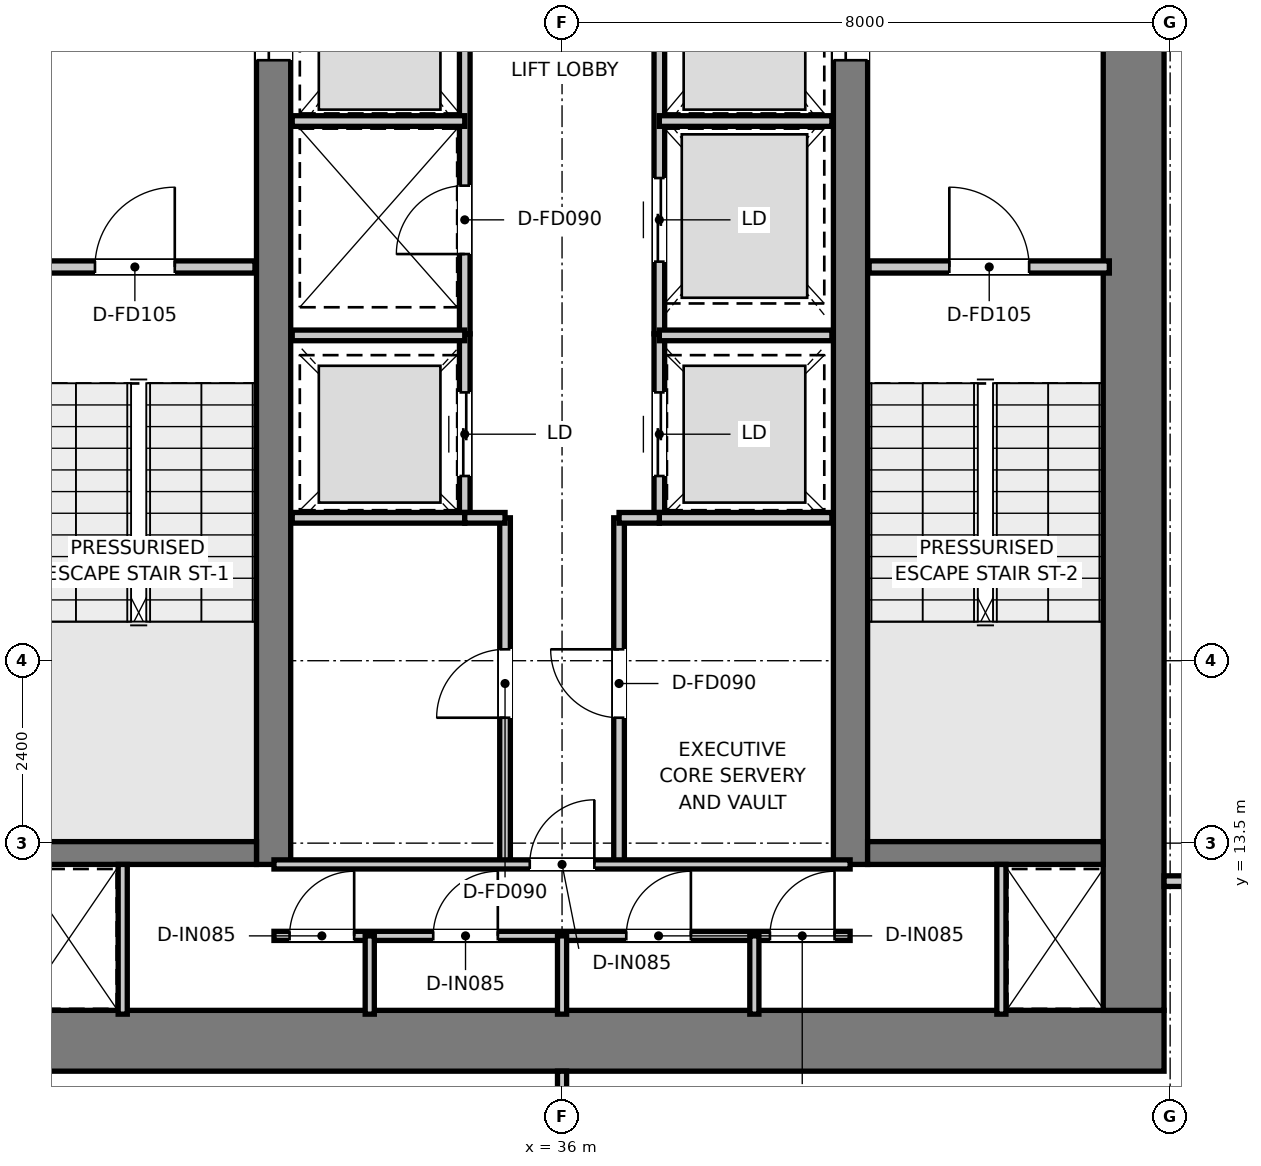
"""IFC4 building model, lengths in metres.
Left out: names, types, materials, properties, quantities, classifications, styles, units other than length and angle.
Written with IfcOpenShell. Run it as: python <this file> out.ifc"""

import sys

from ifc_helpers import new_model, si_unit, direction, frame, frame_2d, origin, place, context, subcontext, project, spatial, rectangle, extrude, element, fill, save


model = new_model("IFC4")
c1 = context("Model", 3, precision=1e-05, world=origin(), true_north=direction((0.0, 1.0)))
c2 = subcontext(c1, "Body", "Model", "MODEL_VIEW")
j1 = project(units=[si_unit("LENGTHUNIT", "METRE"), si_unit("PLANEANGLEUNIT", "RADIAN")], contexts=[c1])
p1 = place(None, origin())
s1 = spatial("IfcSite", under=j1, at=p1, CompositionType="ELEMENT")
p2 = place(p1, origin())
s2 = spatial("IfcBuilding", under=s1, at=p2, CompositionType="ELEMENT")
p3 = place(p2, frame((0.0, 0.0, 347.45)))
s3 = spatial("IfcBuildingStorey", under=s2, at=p3, CompositionType="ELEMENT", Elevation=347.45)
p4 = place(p3, frame((28.08, 10.9, 0.0), z_axis=(0.0, 0.0, 1.0), x_axis=(1.0, 0.0, 0.0)))
e1 = element("IfcWall", 1, at=p4, inside=s3, PredefinedType="SHEAR", context=c2, shape_type="SweptSolid", body=[
    extrude(rectangle(XDim=15.84, YDim=0.8, at=frame_2d((7.92, 0.0))), origin(), (0.0, 0.0, 1.0), 3.95),
])
p5 = place(p3, frame((43.52, 11.3, 0.0), z_axis=(0.0, 0.0, 1.0), x_axis=(0.0, 1.0, 0.0)))
e2 = element("IfcWall", 2, at=p5, inside=s3, PredefinedType="SHEAR", context=c2, shape_type="SweptSolid", body=[
    extrude(rectangle(XDim=14.7, YDim=0.8, at=frame_2d((7.35, 0.0))), origin(), (0.0, 0.0, 1.0), 3.95),
])
p6 = place(p3, frame((32.205, 13.22, 0.0), z_axis=(0.0, 0.0, 1.0), x_axis=(0.0, 1.0, 0.0)))
e3 = element("IfcWall", 3, at=p6, inside=s3, PredefinedType="SHEAR", context=c2, shape_type="SweptSolid", body=[
    extrude(rectangle(XDim=12.78, YDim=0.45, at=frame_2d((6.39, 0.0))), origin(), (0.0, 0.0, 1.0), 3.95),
])
p7 = place(p6, frame((10.58, 0.0, 0.0)))
e4 = element("IfcOpeningElement", 4, at=p7, cuts=e3, PredefinedType="OPENING", context=c2, shape_type="SweptSolid", body=[
    extrude(rectangle(XDim=1.1, YDim=2.15, at=frame_2d((0.55, 1.075))), frame((0.0, 0.235, 0.0), z_axis=(0.0, -1.0, 0.0), x_axis=(1.0, 0.0, 0.0)), (0.0, 0.0, 1.0), 0.47),
])
p8 = place(p3, frame((39.795, 13.22, 0.0), z_axis=(0.0, 0.0, 1.0), x_axis=(0.0, 1.0, 0.0)))
e5 = element("IfcWall", 5, at=p8, inside=s3, PredefinedType="SHEAR", context=c2, shape_type="SweptSolid", body=[
    extrude(rectangle(XDim=12.78, YDim=0.45, at=frame_2d((6.39, 0.0))), origin(), (0.0, 0.0, 1.0), 3.95),
])
p9 = place(p8, frame((10.58, 0.0, 0.0)))
e6 = element("IfcOpeningElement", 6, at=p9, cuts=e5, PredefinedType="OPENING", context=c2, shape_type="SweptSolid", body=[
    extrude(rectangle(XDim=1.1, YDim=2.15, at=frame_2d((0.55, 1.075))), frame((0.0, 0.235, 0.0), z_axis=(0.0, -1.0, 0.0), x_axis=(1.0, 0.0, 0.0)), (0.0, 0.0, 1.0), 0.47),
])
for number, where, z_axis, x_axis in (
    (7, (28.88, 13.37, 0.0), (0.0, 0.0, 1.0), (1.0, 0.0, 0.0)),
    (8, (40.02, 13.37, 0.0), (0.0, 0.0, 1.0), (1.0, 0.0, 0.0)),
):
    element("IfcWall", number, at=place(p3, frame(where, z_axis=z_axis, x_axis=x_axis)), inside=s3, PredefinedType="SHEAR", context=c2, shape_type="SweptSolid", body=[
        extrude(rectangle(XDim=3.1, YDim=0.3, at=frame_2d((1.55, 0.0))), origin(), (0.0, 0.0, 1.0), 3.95),
    ])
p10 = place(p3, frame((28.8, 21.08, 0.0), z_axis=(0.0, 0.0, 1.0), x_axis=(1.0, 0.0, 0.0)))
e9 = element("IfcWall", 9, at=p10, inside=s3, PredefinedType="PARTITIONING", context=c2, shape_type="SweptSolid", body=[
    extrude(rectangle(XDim=3.16, YDim=0.16, at=frame_2d((1.58, 0.0))), origin(), (0.0, 0.0, 1.0), 3.67),
])
p11 = place(p10, frame((1.055, 0.0, 0.0)))
e10 = element("IfcOpeningElement", 10, at=p11, cuts=e9, PredefinedType="OPENING", context=c2, shape_type="SweptSolid", body=[
    extrude(rectangle(XDim=1.05, YDim=2.1, at=frame_2d((0.525, 1.05))), frame((0.0, 0.09, 0.0), z_axis=(0.0, -1.0, 0.0), x_axis=(1.0, 0.0, 0.0)), (0.0, 0.0, 1.0), 0.18),
])
p12 = place(p3, frame((40.04, 21.08, 0.0), z_axis=(0.0, 0.0, 1.0), x_axis=(1.0, 0.0, 0.0)))
e11 = element("IfcWall", 11, at=p12, inside=s3, PredefinedType="PARTITIONING", context=c2, shape_type="SweptSolid", body=[
    extrude(rectangle(XDim=3.16, YDim=0.16, at=frame_2d((1.58, 0.0))), origin(), (0.0, 0.0, 1.0), 3.67),
])
p13 = place(p12, frame((1.055, 0.0, 0.0)))
e12 = element("IfcOpeningElement", 12, at=p13, cuts=e11, PredefinedType="OPENING", context=c2, shape_type="SweptSolid", body=[
    extrude(rectangle(XDim=1.05, YDim=2.1, at=frame_2d((0.525, 1.05))), frame((0.0, 0.09, 0.0), z_axis=(0.0, -1.0, 0.0), x_axis=(1.0, 0.0, 0.0)), (0.0, 0.0, 1.0), 0.18),
])
p14 = place(p3, frame((34.72, 20.2, 0.0), z_axis=(0.0, 0.0, 1.0), x_axis=(0.0, 1.0, 0.0)))
e13 = element("IfcWall", 13, at=p14, inside=s3, PredefinedType="PARTITIONING", context=c2, shape_type="SweptSolid", body=[
    extrude(rectangle(XDim=5.78, YDim=0.14, at=frame_2d((2.89, 0.0))), origin(), (0.0, 0.0, 1.0), 2.82),
])
p15 = place(p14, frame((1.05, 0.0, 0.0)))
e14 = element("IfcOpeningElement", 14, at=p15, cuts=e13, PredefinedType="OPENING", context=c2, shape_type="SweptSolid", body=[
    extrude(rectangle(XDim=0.9, YDim=2.1, at=frame_2d((0.45, 1.05))), frame((0.0, 0.08, 0.0), z_axis=(0.0, -1.0, 0.0), x_axis=(1.0, 0.0, 0.0)), (0.0, 0.0, 1.0), 0.16),
])
p16 = place(p3, frame((37.28, 20.2, 0.0), z_axis=(0.0, 0.0, 1.0), x_axis=(0.0, 1.0, 0.0)))
e15 = element("IfcWall", 15, at=p16, inside=s3, PredefinedType="PARTITIONING", context=c2, shape_type="SweptSolid", body=[
    extrude(rectangle(XDim=5.78, YDim=0.14, at=frame_2d((2.89, 0.0))), origin(), (0.0, 0.0, 1.0), 2.82),
])
p17 = place(p16, frame((0.95, 0.0, 0.0)))
e16 = element("IfcOpeningElement", 16, at=p17, cuts=e15, PredefinedType="OPENING", context=c2, shape_type="SweptSolid", body=[
    extrude(rectangle(XDim=1.1, YDim=2.15, at=frame_2d((0.55, 1.075))), frame((0.0, 0.08, 0.0), z_axis=(0.0, -1.0, 0.0), x_axis=(1.0, 0.0, 0.0)), (0.0, 0.0, 1.0), 0.16),
])
for number, where, z_axis, x_axis in (
    (17, (32.45, 23.0, 0.0), (0.0, 0.0, 1.0), (1.0, 0.0, 0.0)),
    (18, (37.28, 23.0, 0.0), (0.0, 0.0, 1.0), (1.0, 0.0, 0.0)),
):
    element("IfcWall", number, at=place(p3, frame(where, z_axis=z_axis, x_axis=x_axis)), inside=s3, PredefinedType="PARTITIONING", context=c2, shape_type="SweptSolid", body=[
        extrude(rectangle(XDim=2.27, YDim=0.14, at=frame_2d((1.135, 0.0))), origin(), (0.0, 0.0, 1.0), 2.82),
    ])
p18 = place(p3, frame((34.72, 17.78, 0.0), z_axis=(0.0, 0.0, 1.0), x_axis=(0.0, 1.0, 0.0)))
e19 = element("IfcWall", 19, at=p18, inside=s3, PredefinedType="PARTITIONING", context=c2, shape_type="SweptSolid", body=[
    extrude(rectangle(XDim=2.42, YDim=0.14, at=frame_2d((1.21, 0.0))), origin(), (0.0, 0.0, 1.0), 3.67),
])
p19 = place(p18, frame((0.55, 0.0, 0.0)))
e20 = element("IfcOpeningElement", 20, at=p19, cuts=e19, PredefinedType="OPENING", context=c2, shape_type="SweptSolid", body=[
    extrude(rectangle(XDim=1.1, YDim=2.15, at=frame_2d((0.55, 1.075))), frame((0.0, 0.08, 0.0), z_axis=(0.0, -1.0, 0.0), x_axis=(1.0, 0.0, 0.0)), (0.0, 0.0, 1.0), 0.16),
])
p20 = place(p3, frame((37.28, 17.78, 0.0), z_axis=(0.0, 0.0, 1.0), x_axis=(0.0, 1.0, 0.0)))
e21 = element("IfcWall", 21, at=p20, inside=s3, PredefinedType="PARTITIONING", context=c2, shape_type="SweptSolid", body=[
    extrude(rectangle(XDim=2.42, YDim=0.14, at=frame_2d((1.21, 0.0))), origin(), (0.0, 0.0, 1.0), 3.67),
])
p21 = place(p20, frame((0.55, 0.0, 0.0)))
e22 = element("IfcOpeningElement", 22, at=p21, cuts=e21, PredefinedType="OPENING", context=c2, shape_type="SweptSolid", body=[
    extrude(rectangle(XDim=1.1, YDim=2.15, at=frame_2d((0.55, 1.075))), frame((0.0, 0.08, 0.0), z_axis=(0.0, -1.0, 0.0), x_axis=(1.0, 0.0, 0.0)), (0.0, 0.0, 1.0), 0.16),
])
for number, where, z_axis, x_axis in (
    (23, (32.45, 17.78, 0.0), (0.0, 0.0, 1.0), (1.0, 0.0, 0.0)),
    (24, (32.45, 20.18, 0.0), (0.0, 0.0, 1.0), (1.0, 0.0, 0.0)),
    (25, (37.28, 17.78, 0.0), (0.0, 0.0, 1.0), (1.0, 0.0, 0.0)),
    (26, (37.28, 20.18, 0.0), (0.0, 0.0, 1.0), (1.0, 0.0, 0.0)),
):
    element("IfcWall", number, at=place(p3, frame(where, z_axis=z_axis, x_axis=x_axis)), inside=s3, PredefinedType="PARTITIONING", context=c2, shape_type="SweptSolid", body=[
        extrude(rectangle(XDim=2.27, YDim=0.14, at=frame_2d((1.135, 0.0))), origin(), (0.0, 0.0, 1.0), 3.67),
    ])
p22 = place(p3, frame((35.25, 13.22, 0.0), z_axis=(0.0, 0.0, 1.0), x_axis=(0.0, 1.0, 0.0)))
e27 = element("IfcWall", 27, at=p22, inside=s3, PredefinedType="PARTITIONING", context=c2, shape_type="SweptSolid", body=[
    extrude(rectangle(XDim=4.56, YDim=0.14, at=frame_2d((2.28, 0.0))), origin(), (0.0, 0.0, 1.0), 3.67),
])
p23 = place(p22, frame((1.93, 0.0, 0.0)))
e28 = element("IfcOpeningElement", 28, at=p23, cuts=e27, PredefinedType="OPENING", context=c2, shape_type="SweptSolid", body=[
    extrude(rectangle(XDim=0.9, YDim=2.1, at=frame_2d((0.45, 1.05))), frame((0.0, 0.08, 0.0), z_axis=(0.0, -1.0, 0.0), x_axis=(1.0, 0.0, 0.0)), (0.0, 0.0, 1.0), 0.16),
])
p24 = place(p3, frame((34.72, 17.78, 0.0), z_axis=(0.0, 0.0, 1.0), x_axis=(1.0, 0.0, 0.0)))
e29 = element("IfcWall", 29, at=p24, inside=s3, PredefinedType="PARTITIONING", context=c2, shape_type="SweptSolid", body=[
    extrude(rectangle(XDim=0.53, YDim=0.14, at=frame_2d((0.265, 0.0))), origin(), (0.0, 0.0, 1.0), 3.67),
])
p25 = place(p3, frame((36.75, 13.22, 0.0), z_axis=(0.0, 0.0, 1.0), x_axis=(0.0, 1.0, 0.0)))
e30 = element("IfcWall", 30, at=p25, inside=s3, PredefinedType="PARTITIONING", context=c2, shape_type="SweptSolid", body=[
    extrude(rectangle(XDim=4.56, YDim=0.14, at=frame_2d((2.28, 0.0))), origin(), (0.0, 0.0, 1.0), 3.67),
])
p26 = place(p25, frame((1.93, 0.0, 0.0)))
e31 = element("IfcOpeningElement", 31, at=p26, cuts=e30, PredefinedType="OPENING", context=c2, shape_type="SweptSolid", body=[
    extrude(rectangle(XDim=0.9, YDim=2.1, at=frame_2d((0.45, 1.05))), frame((0.0, 0.08, 0.0), z_axis=(0.0, -1.0, 0.0), x_axis=(1.0, 0.0, 0.0)), (0.0, 0.0, 1.0), 0.16),
])
p27 = place(p3, frame((36.75, 17.78, 0.0), z_axis=(0.0, 0.0, 1.0), x_axis=(1.0, 0.0, 0.0)))
e32 = element("IfcWall", 32, at=p27, inside=s3, PredefinedType="PARTITIONING", context=c2, shape_type="SweptSolid", body=[
    extrude(rectangle(XDim=0.53, YDim=0.14, at=frame_2d((0.265, 0.0))), origin(), (0.0, 0.0, 1.0), 3.67),
])
for number, where, z_axis, x_axis in (
    (33, (30.22, 11.25, 0.0), (0.0, 0.0, 1.0), (0.0, 1.0, 0.0)),
    (34, (41.78, 11.25, 0.0), (0.0, 0.0, 1.0), (0.0, 1.0, 0.0)),
):
    element("IfcWall", number, at=place(p3, frame(where, z_axis=z_axis, x_axis=x_axis)), inside=s3, PredefinedType="PARTITIONING", context=c2, shape_type="SweptSolid", body=[
        extrude(rectangle(XDim=1.97, YDim=0.12, at=frame_2d((0.985, 0.0))), origin(), (0.0, 0.0, 1.0), 3.67),
    ])
p28 = place(p3, frame((32.21, 13.22, 0.0), z_axis=(0.0, 0.0, 1.0), x_axis=(1.0, 0.0, 0.0)))
e35 = element("IfcWall", 35, at=p28, inside=s3, PredefinedType="PARTITIONING", context=c2, shape_type="SweptSolid", body=[
    extrude(rectangle(XDim=7.58, YDim=0.12, at=frame_2d((3.79, 0.0))), origin(), (0.0, 0.0, 1.0), 3.67),
])
p29 = place(p28, frame((3.365, 0.0, 0.0)))
e36 = element("IfcOpeningElement", 36, at=p29, cuts=e35, PredefinedType="OPENING", context=c2, shape_type="SweptSolid", body=[
    extrude(rectangle(XDim=0.85, YDim=2.1, at=frame_2d((0.425, 1.05))), frame((0.0, 0.07, 0.0), z_axis=(0.0, -1.0, 0.0), x_axis=(1.0, 0.0, 0.0)), (0.0, 0.0, 1.0), 0.14),
])
p30 = place(p3, frame((32.21, 12.28, 0.0), z_axis=(0.0, 0.0, 1.0), x_axis=(1.0, 0.0, 0.0)))
e37 = element("IfcWall", 37, at=p30, inside=s3, PredefinedType="PARTITIONING", context=c2, shape_type="SweptSolid", body=[
    extrude(rectangle(XDim=7.58, YDim=0.12, at=frame_2d((3.79, 0.0))), origin(), (0.0, 0.0, 1.0), 3.67),
])
p31 = place(p30, frame((0.205, 0.0, 0.0)))
e38 = element("IfcOpeningElement", 38, at=p31, cuts=e37, PredefinedType="OPENING", context=c2, shape_type="SweptSolid", body=[
    extrude(rectangle(XDim=0.85, YDim=2.1, at=frame_2d((0.425, 1.05))), frame((0.0, 0.07, 0.0), z_axis=(0.0, -1.0, 0.0), x_axis=(1.0, 0.0, 0.0)), (0.0, 0.0, 1.0), 0.14),
])
p32 = place(p30, frame((2.095, 0.0, 0.0)))
e39 = element("IfcOpeningElement", 39, at=p32, cuts=e37, PredefinedType="OPENING", context=c2, shape_type="SweptSolid", body=[
    extrude(rectangle(XDim=0.85, YDim=2.1, at=frame_2d((0.425, 1.05))), frame((0.0, 0.07, 0.0), z_axis=(0.0, -1.0, 0.0), x_axis=(1.0, 0.0, 0.0)), (0.0, 0.0, 1.0), 0.14),
])
p33 = place(p30, frame((4.635, 0.0, 0.0)))
e40 = element("IfcOpeningElement", 40, at=p33, cuts=e37, PredefinedType="OPENING", context=c2, shape_type="SweptSolid", body=[
    extrude(rectangle(XDim=0.85, YDim=2.1, at=frame_2d((0.425, 1.05))), frame((0.0, 0.07, 0.0), z_axis=(0.0, -1.0, 0.0), x_axis=(1.0, 0.0, 0.0)), (0.0, 0.0, 1.0), 0.14),
])
p34 = place(p30, frame((6.525, 0.0, 0.0)))
e41 = element("IfcOpeningElement", 41, at=p34, cuts=e37, PredefinedType="OPENING", context=c2, shape_type="SweptSolid", body=[
    extrude(rectangle(XDim=0.85, YDim=2.1, at=frame_2d((0.425, 1.05))), frame((0.0, 0.07, 0.0), z_axis=(0.0, -1.0, 0.0), x_axis=(1.0, 0.0, 0.0)), (0.0, 0.0, 1.0), 0.14),
])
for number, where, z_axis, x_axis in (
    (42, (33.47, 11.25, 0.0), (0.0, 0.0, 1.0), (0.0, 1.0, 0.0)),
    (43, (36.0, 11.25, 0.0), (0.0, 0.0, 1.0), (0.0, 1.0, 0.0)),
    (44, (38.53, 11.25, 0.0), (0.0, 0.0, 1.0), (0.0, 1.0, 0.0)),
):
    element("IfcWall", number, at=place(p3, frame(where, z_axis=z_axis, x_axis=x_axis)), inside=s3, PredefinedType="PARTITIONING", context=c2, shape_type="SweptSolid", body=[
        extrude(rectangle(XDim=1.03, YDim=0.12, at=frame_2d((0.515, 0.0))), origin(), (0.0, 0.0, 1.0), 3.67),
    ])
p35 = place(p3, frame((43.92, 13.0, 0.0), z_axis=(0.0, 0.0, 1.0), x_axis=(1.0, 0.0, 0.0)))
e45 = element("IfcWall", 45, at=p35, inside=s3, PredefinedType="PARTITIONING", context=c2, shape_type="SweptSolid", body=[
    extrude(rectangle(XDim=9.592, YDim=0.14, at=frame_2d((4.796, 0.0))), origin(), (0.0, 0.0, 1.0), 3.18),
])
p36 = place(p35, frame((0.455, 0.0, 0.0)))
e46 = element("IfcOpeningElement", 46, at=p36, cuts=e45, PredefinedType="OPENING", context=c2, shape_type="SweptSolid", body=[
    extrude(rectangle(XDim=0.85, YDim=2.1, at=frame_2d((0.425, 1.05))), frame((0.0, 0.08, 0.0), z_axis=(0.0, -1.0, 0.0), x_axis=(1.0, 0.0, 0.0)), (0.0, 0.0, 1.0), 0.16),
])
p37 = place(p3, frame((36.0, 7.064, 0.0), z_axis=(0.0, 0.0, 1.0), x_axis=(0.0, 1.0, 0.0)))
e47 = element("IfcWall", 47, at=p37, inside=s3, PredefinedType="PARTITIONING", context=c2, shape_type="SweptSolid", body=[
    extrude(rectangle(XDim=3.436, YDim=0.12, at=frame_2d((1.718, 0.0))), origin(), (0.0, 0.0, 1.0), 3.67),
])
p38 = place(p11, origin())
e48 = element("IfcDoor", 48, at=p38, inside=s3, OperationType="SINGLE_SWING_RIGHT", PredefinedType="DOOR", context=c2, shape_type="SweptSolid", body=[
    extrude(rectangle(XDim=1.05, YDim=2.1, at=frame_2d((0.525, 1.05))), frame((0.0, 0.025, 0.0), z_axis=(0.0, -1.0, 0.0), x_axis=(1.0, 0.0, 0.0)), (0.0, 0.0, 1.0), 0.05),
])
fill(e10, e48)
p39 = place(p13, origin())
e49 = element("IfcDoor", 49, at=p39, inside=s3, OperationType="SINGLE_SWING_LEFT", PredefinedType="DOOR", context=c2, shape_type="SweptSolid", body=[
    extrude(rectangle(XDim=1.05, YDim=2.1, at=frame_2d((0.525, 1.05))), frame((0.0, 0.025, 0.0), z_axis=(0.0, -1.0, 0.0), x_axis=(1.0, 0.0, 0.0)), (0.0, 0.0, 1.0), 0.05),
])
fill(e12, e49)
p40 = place(p7, origin())
e50 = element("IfcDoor", 50, at=p40, inside=s3, OperationType="DOUBLE_DOOR_SLIDING", PredefinedType="DOOR", context=c2, shape_type="SweptSolid", body=[
    extrude(rectangle(XDim=1.1, YDim=2.15, at=frame_2d((0.55, 1.075))), frame((0.0, 0.025, 0.0), z_axis=(0.0, -1.0, 0.0), x_axis=(1.0, 0.0, 0.0)), (0.0, 0.0, 1.0), 0.05),
])
fill(e4, e50)
p41 = place(p9, origin())
e51 = element("IfcDoor", 51, at=p41, inside=s3, OperationType="DOUBLE_DOOR_SLIDING", PredefinedType="DOOR", context=c2, shape_type="SweptSolid", body=[
    extrude(rectangle(XDim=1.1, YDim=2.15, at=frame_2d((0.55, 1.075))), frame((0.0, 0.025, 0.0), z_axis=(0.0, -1.0, 0.0), x_axis=(1.0, 0.0, 0.0)), (0.0, 0.0, 1.0), 0.05),
])
fill(e6, e51)
p42 = place(p15, origin())
e52 = element("IfcDoor", 52, at=p42, inside=s3, OperationType="SINGLE_SWING_LEFT", PredefinedType="DOOR", context=c2, shape_type="SweptSolid", body=[
    extrude(rectangle(XDim=0.9, YDim=2.1, at=frame_2d((0.45, 1.05))), frame((0.0, 0.025, 0.0), z_axis=(0.0, -1.0, 0.0), x_axis=(1.0, 0.0, 0.0)), (0.0, 0.0, 1.0), 0.05),
])
fill(e14, e52)
p43 = place(p17, origin())
e53 = element("IfcDoor", 53, at=p43, inside=s3, OperationType="DOUBLE_DOOR_SLIDING", PredefinedType="DOOR", context=c2, shape_type="SweptSolid", body=[
    extrude(rectangle(XDim=1.1, YDim=2.15, at=frame_2d((0.55, 1.075))), frame((0.0, 0.025, 0.0), z_axis=(0.0, -1.0, 0.0), x_axis=(1.0, 0.0, 0.0)), (0.0, 0.0, 1.0), 0.05),
])
fill(e16, e53)
p44 = place(p19, origin())
e54 = element("IfcDoor", 54, at=p44, inside=s3, OperationType="DOUBLE_DOOR_SLIDING", PredefinedType="DOOR", context=c2, shape_type="SweptSolid", body=[
    extrude(rectangle(XDim=1.1, YDim=2.15, at=frame_2d((0.55, 1.075))), frame((0.0, 0.025, 0.0), z_axis=(0.0, -1.0, 0.0), x_axis=(1.0, 0.0, 0.0)), (0.0, 0.0, 1.0), 0.05),
])
fill(e20, e54)
p45 = place(p21, origin())
e55 = element("IfcDoor", 55, at=p45, inside=s3, OperationType="DOUBLE_DOOR_SLIDING", PredefinedType="DOOR", context=c2, shape_type="SweptSolid", body=[
    extrude(rectangle(XDim=1.1, YDim=2.15, at=frame_2d((0.55, 1.075))), frame((0.0, 0.025, 0.0), z_axis=(0.0, -1.0, 0.0), x_axis=(1.0, 0.0, 0.0)), (0.0, 0.0, 1.0), 0.05),
])
fill(e22, e55)
p46 = place(p23, origin())
e56 = element("IfcDoor", 56, at=p46, inside=s3, OperationType="SINGLE_SWING_LEFT", PredefinedType="DOOR", context=c2, shape_type="SweptSolid", body=[
    extrude(rectangle(XDim=0.9, YDim=2.1, at=frame_2d((0.45, 1.05))), frame((0.0, 0.025, 0.0), z_axis=(0.0, -1.0, 0.0), x_axis=(1.0, 0.0, 0.0)), (0.0, 0.0, 1.0), 0.05),
])
fill(e28, e56)
p47 = place(p26, origin())
e57 = element("IfcDoor", 57, at=p47, inside=s3, OperationType="SINGLE_SWING_RIGHT", PredefinedType="DOOR", context=c2, shape_type="SweptSolid", body=[
    extrude(rectangle(XDim=0.9, YDim=2.1, at=frame_2d((0.45, 1.05))), frame((0.0, 0.025, 0.0), z_axis=(0.0, -1.0, 0.0), x_axis=(1.0, 0.0, 0.0)), (0.0, 0.0, 1.0), 0.05),
])
fill(e31, e57)
p48 = place(p29, origin())
e58 = element("IfcDoor", 58, at=p48, inside=s3, OperationType="SINGLE_SWING_RIGHT", PredefinedType="DOOR", context=c2, shape_type="SweptSolid", body=[
    extrude(rectangle(XDim=0.85, YDim=2.1, at=frame_2d((0.425, 1.05))), frame((0.0, 0.025, 0.0), z_axis=(0.0, -1.0, 0.0), x_axis=(1.0, 0.0, 0.0)), (0.0, 0.0, 1.0), 0.05),
])
fill(e36, e58)
p49 = place(p31, origin())
e59 = element("IfcDoor", 59, at=p49, inside=s3, OperationType="SINGLE_SWING_RIGHT", PredefinedType="DOOR", context=c2, shape_type="SweptSolid", body=[
    extrude(rectangle(XDim=0.85, YDim=2.1, at=frame_2d((0.425, 1.05))), frame((0.0, 0.025, 0.0), z_axis=(0.0, -1.0, 0.0), x_axis=(1.0, 0.0, 0.0)), (0.0, 0.0, 1.0), 0.05),
])
fill(e38, e59)
p50 = place(p32, origin())
e60 = element("IfcDoor", 60, at=p50, inside=s3, OperationType="SINGLE_SWING_RIGHT", PredefinedType="DOOR", context=c2, shape_type="SweptSolid", body=[
    extrude(rectangle(XDim=0.85, YDim=2.1, at=frame_2d((0.425, 1.05))), frame((0.0, 0.025, 0.0), z_axis=(0.0, -1.0, 0.0), x_axis=(1.0, 0.0, 0.0)), (0.0, 0.0, 1.0), 0.05),
])
fill(e39, e60)
p51 = place(p33, origin())
e61 = element("IfcDoor", 61, at=p51, inside=s3, OperationType="SINGLE_SWING_RIGHT", PredefinedType="DOOR", context=c2, shape_type="SweptSolid", body=[
    extrude(rectangle(XDim=0.85, YDim=2.1, at=frame_2d((0.425, 1.05))), frame((0.0, 0.025, 0.0), z_axis=(0.0, -1.0, 0.0), x_axis=(1.0, 0.0, 0.0)), (0.0, 0.0, 1.0), 0.05),
])
fill(e40, e61)
p52 = place(p34, origin())
e62 = element("IfcDoor", 62, at=p52, inside=s3, OperationType="SINGLE_SWING_RIGHT", PredefinedType="DOOR", context=c2, shape_type="SweptSolid", body=[
    extrude(rectangle(XDim=0.85, YDim=2.1, at=frame_2d((0.425, 1.05))), frame((0.0, 0.025, 0.0), z_axis=(0.0, -1.0, 0.0), x_axis=(1.0, 0.0, 0.0)), (0.0, 0.0, 1.0), 0.05),
])
fill(e41, e62)
save(model, sys.argv[1])
